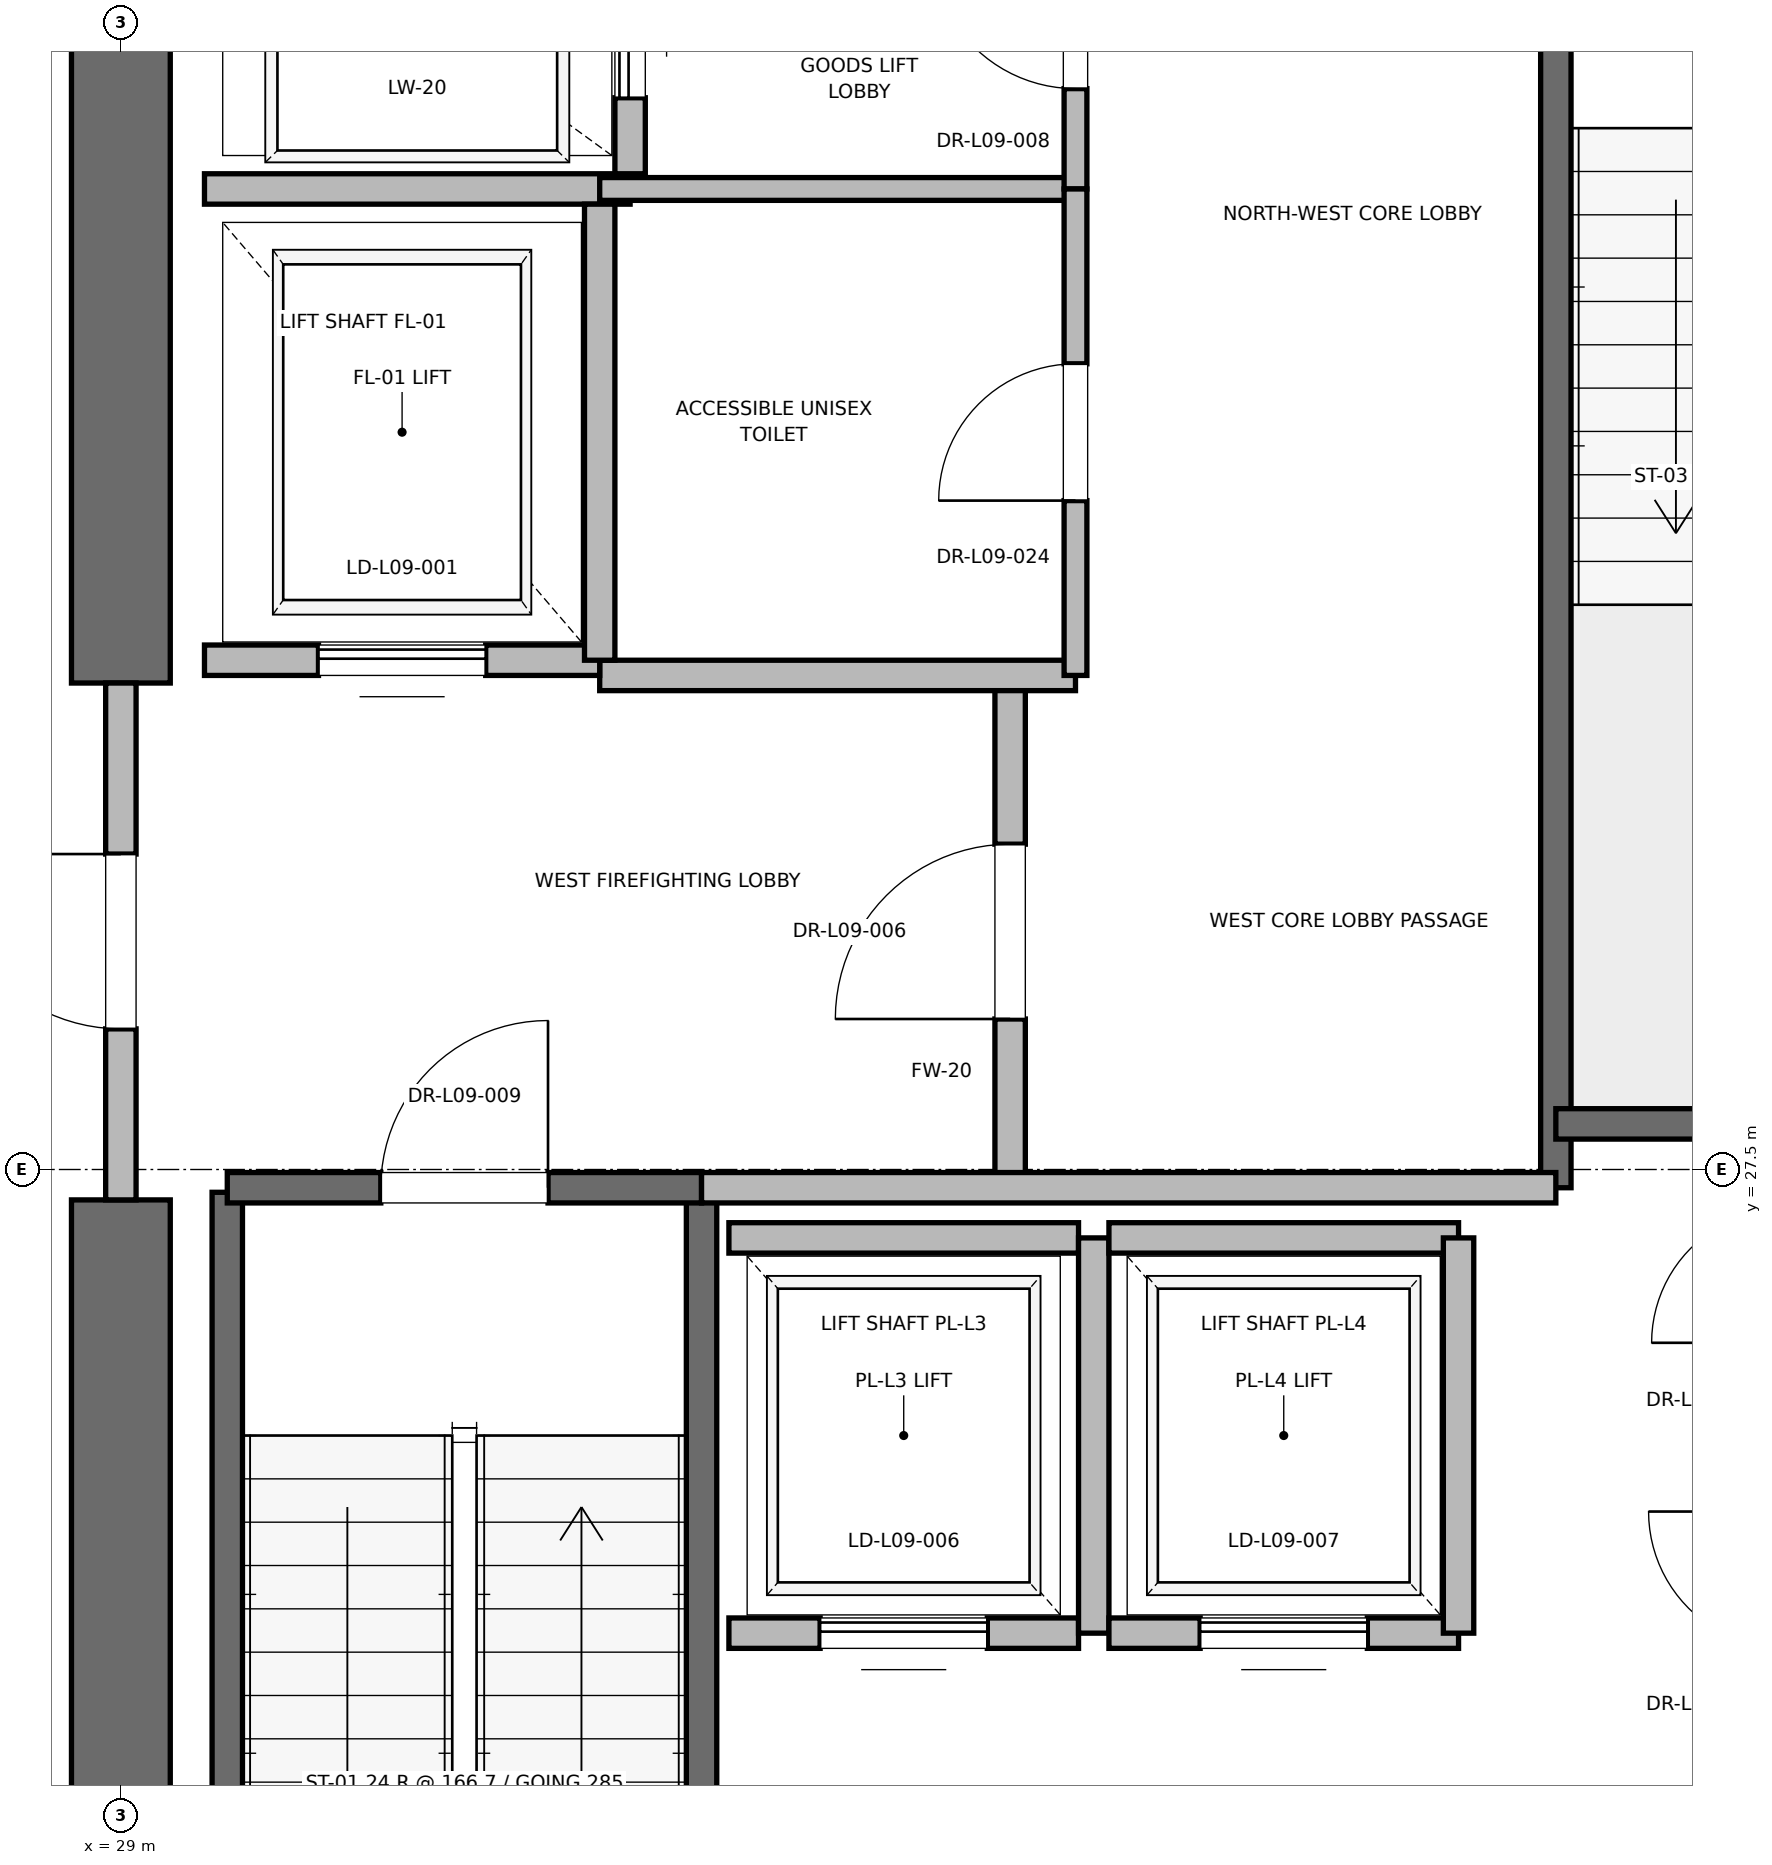
"""IFC4 building model, lengths in metres.
Left out: names, types, materials, properties, quantities, classifications, styles, units other than length and angle.
Written with IfcOpenShell. Run it as: python <this file> out.ifc"""

import sys

from ifc_helpers import new_model, si_unit, direction, frame, frame_2d, origin, place, context, subcontext, project, spatial, rectangle, extrude, element, fill, save


model = new_model("IFC4")
c1 = context("Model", 3, precision=1e-05, world=origin(), true_north=direction((0.0, 1.0)))
c2 = subcontext(c1, "Body", "Model", "MODEL_VIEW")
j1 = project(units=[si_unit("LENGTHUNIT", "METRE"), si_unit("PLANEANGLEUNIT", "RADIAN")], contexts=[c1])
p1 = place(None, origin())
s1 = spatial("IfcSite", under=j1, at=p1, CompositionType="ELEMENT")
p2 = place(p1, origin())
s2 = spatial("IfcBuilding", under=s1, at=p2, CompositionType="ELEMENT")
p3 = place(p2, frame((0.0, 0.0, 43.6)))
s3 = spatial("IfcBuildingStorey", under=s2, at=p3, CompositionType="ELEMENT", Elevation=43.6)
p4 = place(p3, frame((29.0, 18.5, 0.0), z_axis=(0.0, 0.0, 1.0), x_axis=(0.0, 1.0, 0.0)))
e1 = element("IfcWall", 1, at=p4, inside=s3, PredefinedType="SHEAR", context=c2, shape_type="SweptSolid", body=[
    extrude(rectangle(XDim=8.8, YDim=0.65, at=frame_2d((4.4, 0.0))), origin(), (0.0, 0.0, 1.0), 3.76),
])
p5 = place(p3, frame((29.0, 30.7, 0.0), z_axis=(0.0, 0.0, 1.0), x_axis=(0.0, 1.0, 0.0)))
e2 = element("IfcWall", 2, at=p5, inside=s3, PredefinedType="SHEAR", context=c2, shape_type="SweptSolid", body=[
    extrude(rectangle(XDim=5.8, YDim=0.65, at=frame_2d((2.9, 0.0))), origin(), (0.0, 0.0, 1.0), 3.76),
])
p6 = place(p3, frame((29.7, 19.2, 0.0), z_axis=(0.0, 0.0, 1.0), x_axis=(0.0, 1.0, 0.0)))
e3 = element("IfcWall", 3, at=p6, inside=s3, PredefinedType="SOLIDWALL", context=c2, shape_type="SweptSolid", body=[
    extrude(rectangle(XDim=8.15, YDim=0.2, at=frame_2d((4.075, 0.0))), origin(), (0.0, 0.0, 1.0), 3.76),
])
p7 = place(p3, frame((32.82, 18.6, 0.0), z_axis=(0.0, 0.0, 1.0), x_axis=(0.0, 1.0, 0.0)))
e4 = element("IfcWall", 4, at=p7, inside=s3, PredefinedType="SOLIDWALL", context=c2, shape_type="SweptSolid", body=[
    extrude(rectangle(XDim=8.78, YDim=0.2, at=frame_2d((4.39, 0.0))), origin(), (0.0, 0.0, 1.0), 3.76),
])
p8 = place(p3, frame((29.7, 27.38, 0.0), z_axis=(0.0, 0.0, 1.0), x_axis=(1.0, 0.0, 0.0)))
e5 = element("IfcWall", 5, at=p8, inside=s3, PredefinedType="SOLIDWALL", context=c2, shape_type="SweptSolid", body=[
    extrude(rectangle(XDim=3.12, YDim=0.2, at=frame_2d((1.56, 0.0))), origin(), (0.0, 0.0, 1.0), 3.76),
])
p9 = place(p8, frame((1.01, 0.0, 0.0)))
e6 = element("IfcOpeningElement", 6, at=p9, cuts=e5, PredefinedType="OPENING", context=c2, shape_type="SweptSolid", body=[
    extrude(rectangle(XDim=1.1, YDim=2.15, at=frame_2d((0.55, 1.075))), frame((0.0, 0.1, 0.0), z_axis=(0.0, -1.0, 0.0), x_axis=(1.0, 0.0, 0.0)), (0.0, 0.0, 1.0), 0.2),
])
p10 = place(p3, frame((38.44, 27.38, 0.0), z_axis=(0.0, 0.0, 1.0), x_axis=(0.0, 1.0, 0.0)))
e7 = element("IfcWall", 7, at=p10, inside=s3, PredefinedType="SOLIDWALL", context=c2, shape_type="SweptSolid", body=[
    extrude(rectangle(XDim=8.87, YDim=0.2, at=frame_2d((4.435, 0.0))), origin(), (0.0, 0.0, 1.0), 3.76),
])
p11 = place(p3, frame((38.44, 27.8, 0.0), z_axis=(0.0, 0.0, 1.0), x_axis=(1.0, 0.0, 0.0)))
e8 = element("IfcWall", 8, at=p11, inside=s3, PredefinedType="SOLIDWALL", context=c2, shape_type="SweptSolid", body=[
    extrude(rectangle(XDim=3.32, YDim=0.2, at=frame_2d((1.66, 0.0))), origin(), (0.0, 0.0, 1.0), 3.76),
])
p12 = place(p3, frame((34.85, 27.38, 0.0), z_axis=(0.0, 0.0, 1.0), x_axis=(0.0, 1.0, 0.0)))
e9 = element("IfcWall", 9, at=p12, inside=s3, PredefinedType="PARTITIONING", context=c2, shape_type="SweptSolid", body=[
    extrude(rectangle(XDim=3.37, YDim=0.2, at=frame_2d((1.685, 0.0))), origin(), (0.0, 0.0, 1.0), 3.76),
])
p13 = place(p12, frame((1.11, 0.0, 0.0)))
e10 = element("IfcOpeningElement", 10, at=p13, cuts=e9, PredefinedType="OPENING", context=c2, shape_type="SweptSolid", body=[
    extrude(rectangle(XDim=1.15, YDim=2.2, at=frame_2d((0.575, 1.1))), frame((0.0, 0.1, 0.0), z_axis=(0.0, -1.0, 0.0), x_axis=(1.0, 0.0, 0.0)), (0.0, 0.0, 1.0), 0.2),
])
p14 = place(p3, frame((29.0, 27.3, 0.0), z_axis=(0.0, 0.0, 1.0), x_axis=(0.0, 1.0, 0.0)))
e11 = element("IfcWall", 11, at=p14, inside=s3, PredefinedType="PARTITIONING", context=c2, shape_type="SweptSolid", body=[
    extrude(rectangle(XDim=3.4, YDim=0.2, at=frame_2d((1.7, 0.0))), origin(), (0.0, 0.0, 1.0), 2.54),
])
p15 = place(p14, frame((1.125, 0.0, 0.0)))
e12 = element("IfcOpeningElement", 12, at=p15, cuts=e11, PredefinedType="OPENING", context=c2, shape_type="SweptSolid", body=[
    extrude(rectangle(XDim=1.15, YDim=2.2, at=frame_2d((0.575, 1.1))), frame((0.0, 0.1, 0.0), z_axis=(0.0, -1.0, 0.0), x_axis=(1.0, 0.0, 0.0)), (0.0, 0.0, 1.0), 0.2),
])
p16 = place(p3, frame((32.82, 27.38, 0.0), z_axis=(0.0, 0.0, 1.0), x_axis=(1.0, 0.0, 0.0)))
e13 = element("IfcWall", 13, at=p16, inside=s3, PredefinedType="PARTITIONING", context=c2, shape_type="SweptSolid", body=[
    extrude(rectangle(XDim=5.62, YDim=0.2, at=frame_2d((2.81, 0.0))), origin(), (0.0, 0.0, 1.0), 3.76),
])
p17 = place(p3, frame((32.15, 30.75, 0.0), z_axis=(0.0, 0.0, 1.0), x_axis=(1.0, 0.0, 0.0)))
e14 = element("IfcWall", 14, at=p17, inside=s3, PredefinedType="PARTITIONING", context=c2, shape_type="SweptSolid", body=[
    extrude(rectangle(XDim=3.13, YDim=0.2, at=frame_2d((1.565, 0.0))), origin(), (0.0, 0.0, 1.0), 3.76),
])
p18 = place(p3, frame((29.55, 30.85, 0.0), z_axis=(0.0, 0.0, 1.0), x_axis=(1.0, 0.0, 0.0)))
e15 = element("IfcWall", 15, at=p18, inside=s3, PredefinedType="SOLIDWALL", context=c2, shape_type="SweptSolid", body=[
    extrude(rectangle(XDim=2.6, YDim=0.2, at=frame_2d((1.3, 0.0))), origin(), (0.0, 0.0, 1.0), 2.54),
])
p19 = place(p18, frame((0.75, 0.0, 0.0)))
e16 = element("IfcOpeningElement", 16, at=p19, cuts=e15, PredefinedType="OPENING", context=c2, shape_type="SweptSolid", body=[
    extrude(rectangle(XDim=1.1, YDim=2.2, at=frame_2d((0.55, 1.1))), frame((0.0, 0.1, 0.0), z_axis=(0.0, -1.0, 0.0), x_axis=(1.0, 0.0, 0.0)), (0.0, 0.0, 1.0), 0.2),
])
p20 = place(p3, frame((29.55, 33.95, 0.0), z_axis=(0.0, 0.0, 1.0), x_axis=(1.0, 0.0, 0.0)))
e17 = element("IfcWall", 17, at=p20, inside=s3, PredefinedType="SOLIDWALL", context=c2, shape_type="SweptSolid", body=[
    extrude(rectangle(XDim=2.8, YDim=0.2, at=frame_2d((1.4, 0.0))), origin(), (0.0, 0.0, 1.0), 3.76),
])
p21 = place(p3, frame((32.15, 30.85, 0.0), z_axis=(0.0, 0.0, 1.0), x_axis=(0.0, 1.0, 0.0)))
e18 = element("IfcWall", 18, at=p21, inside=s3, PredefinedType="SOLIDWALL", context=c2, shape_type="SweptSolid", body=[
    extrude(rectangle(XDim=3.0, YDim=0.2, at=frame_2d((1.5, 0.0))), origin(), (0.0, 0.0, 1.0), 3.76),
])
p22 = place(p3, frame((32.35, 34.05, 0.0), z_axis=(0.0, 0.0, 1.0), x_axis=(0.0, 1.0, 0.0)))
e19 = element("IfcWall", 19, at=p22, inside=s3, PredefinedType="SOLIDWALL", context=c2, shape_type="SweptSolid", body=[
    extrude(rectangle(XDim=2.1, YDim=0.2, at=frame_2d((1.05, 0.0))), origin(), (0.0, 0.0, 1.0), 3.76),
])
p23 = place(p22, frame((0.5, 0.0, 0.0)))
e20 = element("IfcOpeningElement", 20, at=p23, cuts=e19, PredefinedType="OPENING", context=c2, shape_type="SweptSolid", body=[
    extrude(rectangle(XDim=1.1, YDim=2.2, at=frame_2d((0.55, 1.1))), frame((0.0, 0.1, 0.0), z_axis=(0.0, -1.0, 0.0), x_axis=(1.0, 0.0, 0.0)), (0.0, 0.0, 1.0), 0.2),
])
p24 = place(p3, frame((33.0, 24.45, 0.0), z_axis=(0.0, 0.0, 1.0), x_axis=(1.0, 0.0, 0.0)))
e21 = element("IfcWall", 21, at=p24, inside=s3, PredefinedType="SOLIDWALL", context=c2, shape_type="SweptSolid", body=[
    extrude(rectangle(XDim=2.3, YDim=0.2, at=frame_2d((1.15, 0.0))), origin(), (0.0, 0.0, 1.0), 3.76),
])
p25 = place(p24, frame((0.6, 0.0, 0.0)))
e22 = element("IfcOpeningElement", 22, at=p25, cuts=e21, PredefinedType="OPENING", context=c2, shape_type="SweptSolid", body=[
    extrude(rectangle(XDim=1.1, YDim=2.2, at=frame_2d((0.55, 1.1))), frame((0.0, 0.1, 0.0), z_axis=(0.0, -1.0, 0.0), x_axis=(1.0, 0.0, 0.0)), (0.0, 0.0, 1.0), 0.2),
])
p26 = place(p3, frame((35.3, 27.05, 0.0), z_axis=(0.0, 0.0, 1.0), x_axis=(-1.0, 0.0, 0.0)))
e23 = element("IfcWall", 23, at=p26, inside=s3, PredefinedType="SOLIDWALL", context=c2, shape_type="SweptSolid", body=[
    extrude(rectangle(XDim=2.3, YDim=0.2, at=frame_2d((1.15, 0.0))), origin(), (0.0, 0.0, 1.0), 3.76),
])
p27 = place(p3, frame((35.4, 24.45, 0.0), z_axis=(0.0, 0.0, 1.0), x_axis=(0.0, 1.0, 0.0)))
e24 = element("IfcWall", 24, at=p27, inside=s3, PredefinedType="SOLIDWALL", context=c2, shape_type="SweptSolid", body=[
    extrude(rectangle(XDim=2.6, YDim=0.2, at=frame_2d((1.3, 0.0))), origin(), (0.0, 0.0, 1.0), 3.76),
])
p28 = place(p3, frame((35.5, 24.45, 0.0), z_axis=(0.0, 0.0, 1.0), x_axis=(1.0, 0.0, 0.0)))
e25 = element("IfcWall", 25, at=p28, inside=s3, PredefinedType="SOLIDWALL", context=c2, shape_type="SweptSolid", body=[
    extrude(rectangle(XDim=2.3, YDim=0.2, at=frame_2d((1.15, 0.0))), origin(), (0.0, 0.0, 1.0), 3.76),
])
p29 = place(p28, frame((0.6, 0.0, 0.0)))
e26 = element("IfcOpeningElement", 26, at=p29, cuts=e25, PredefinedType="OPENING", context=c2, shape_type="SweptSolid", body=[
    extrude(rectangle(XDim=1.1, YDim=2.2, at=frame_2d((0.55, 1.1))), frame((0.0, 0.1, 0.0), z_axis=(0.0, -1.0, 0.0), x_axis=(1.0, 0.0, 0.0)), (0.0, 0.0, 1.0), 0.2),
])
p30 = place(p3, frame((37.8, 27.05, 0.0), z_axis=(0.0, 0.0, 1.0), x_axis=(-1.0, 0.0, 0.0)))
e27 = element("IfcWall", 27, at=p30, inside=s3, PredefinedType="SOLIDWALL", context=c2, shape_type="SweptSolid", body=[
    extrude(rectangle(XDim=2.3, YDim=0.2, at=frame_2d((1.15, 0.0))), origin(), (0.0, 0.0, 1.0), 3.76),
])
p31 = place(p3, frame((37.8, 24.45, 0.0), z_axis=(0.0, 0.0, 1.0), x_axis=(0.0, 1.0, 0.0)))
e28 = element("IfcWall", 28, at=p31, inside=s3, PredefinedType="SOLIDWALL", context=c2, shape_type="SweptSolid", body=[
    extrude(rectangle(XDim=2.6, YDim=0.2, at=frame_2d((1.3, 0.0))), origin(), (0.0, 0.0, 1.0), 3.76),
])
p32 = place(p3, frame((32.15, 33.95, 0.0), z_axis=(0.0, 0.0, 1.0), x_axis=(1.0, 0.0, 0.0)))
e29 = element("IfcWall", 29, at=p32, inside=s3, PredefinedType="PARTITIONING", context=c2, shape_type="SweptSolid", body=[
    extrude(rectangle(XDim=3.13, YDim=0.15, at=frame_2d((1.565, 0.0))), origin(), (0.0, 0.0, 1.0), 2.85),
])
p33 = place(p3, frame((35.28, 33.95, 0.0), z_axis=(0.0, 0.0, 1.0), x_axis=(0.0, 1.0, 0.0)))
e30 = element("IfcWall", 30, at=p33, inside=s3, PredefinedType="PARTITIONING", context=c2, shape_type="SweptSolid", body=[
    extrude(rectangle(XDim=2.27, YDim=0.15, at=frame_2d((1.135, 0.0))), origin(), (0.0, 0.0, 1.0), 2.54),
])
p34 = place(p33, frame((0.66, 0.0, 0.0)))
e31 = element("IfcOpeningElement", 31, at=p34, cuts=e30, PredefinedType="OPENING", context=c2, shape_type="SweptSolid", body=[
    extrude(rectangle(XDim=0.95, YDim=2.15, at=frame_2d((0.475, 1.075))), frame((0.0, 0.075, 0.0), z_axis=(0.0, -1.0, 0.0), x_axis=(1.0, 0.0, 0.0)), (0.0, 0.0, 1.0), 0.15),
])
p35 = place(p3, frame((35.28, 30.75, 0.0), z_axis=(0.0, 0.0, 1.0), x_axis=(0.0, 1.0, 0.0)))
e32 = element("IfcWall", 32, at=p35, inside=s3, PredefinedType="PARTITIONING", context=c2, shape_type="SweptSolid", body=[
    extrude(rectangle(XDim=3.2, YDim=0.15, at=frame_2d((1.6, 0.0))), origin(), (0.0, 0.0, 1.0), 2.85),
])
p36 = place(p35, frame((1.15, 0.0, 0.0)))
e33 = element("IfcOpeningElement", 33, at=p36, cuts=e32, PredefinedType="OPENING", context=c2, shape_type="SweptSolid", body=[
    extrude(rectangle(XDim=0.9, YDim=2.1, at=frame_2d((0.45, 1.05))), frame((0.0, 0.075, 0.0), z_axis=(0.0, -1.0, 0.0), x_axis=(1.0, 0.0, 0.0)), (0.0, 0.0, 1.0), 0.15),
])
p37 = place(p9, origin())
e34 = element("IfcDoor", 34, at=p37, inside=s3, OperationType="SINGLE_SWING_RIGHT", PredefinedType="DOOR", context=c2, shape_type="SweptSolid", body=[
    extrude(rectangle(XDim=1.1, YDim=2.15, at=frame_2d((0.55, 1.075))), frame((0.0, 0.025, 0.0), z_axis=(0.0, -1.0, 0.0), x_axis=(1.0, 0.0, 0.0)), (0.0, 0.0, 1.0), 0.05),
])
fill(e6, e34)
p38 = place(p13, origin())
e35 = element("IfcDoor", 35, at=p38, inside=s3, OperationType="SINGLE_SWING_LEFT", PredefinedType="DOOR", context=c2, shape_type="SweptSolid", body=[
    extrude(rectangle(XDim=1.15, YDim=2.2, at=frame_2d((0.575, 1.1))), frame((0.0, 0.025, 0.0), z_axis=(0.0, -1.0, 0.0), x_axis=(1.0, 0.0, 0.0)), (0.0, 0.0, 1.0), 0.05),
])
fill(e10, e35)
p39 = place(p15, origin())
e36 = element("IfcDoor", 36, at=p39, inside=s3, OperationType="SINGLE_SWING_RIGHT", PredefinedType="DOOR", context=c2, shape_type="SweptSolid", body=[
    extrude(rectangle(XDim=1.15, YDim=2.2, at=frame_2d((0.575, 1.1))), frame((0.0, 0.025, 0.0), z_axis=(0.0, -1.0, 0.0), x_axis=(1.0, 0.0, 0.0)), (0.0, 0.0, 1.0), 0.05),
])
fill(e12, e36)
p40 = place(p19, origin())
e37 = element("IfcDoor", 37, at=p40, inside=s3, OperationType="SLIDING_TO_RIGHT", PredefinedType="DOOR", context=c2, shape_type="SweptSolid", body=[
    extrude(rectangle(XDim=1.1, YDim=2.2, at=frame_2d((0.55, 1.1))), frame((0.0, 0.025, 0.0), z_axis=(0.0, -1.0, 0.0), x_axis=(1.0, 0.0, 0.0)), (0.0, 0.0, 1.0), 0.05),
])
fill(e16, e37)
p41 = place(p23, origin())
e38 = element("IfcDoor", 38, at=p41, inside=s3, OperationType="SLIDING_TO_RIGHT", PredefinedType="DOOR", context=c2, shape_type="SweptSolid", body=[
    extrude(rectangle(XDim=1.1, YDim=2.2, at=frame_2d((0.55, 1.1))), frame((0.0, 0.025, 0.0), z_axis=(0.0, -1.0, 0.0), x_axis=(1.0, 0.0, 0.0)), (0.0, 0.0, 1.0), 0.05),
])
fill(e20, e38)
p42 = place(p25, origin())
e39 = element("IfcDoor", 39, at=p42, inside=s3, OperationType="SLIDING_TO_RIGHT", PredefinedType="DOOR", context=c2, shape_type="SweptSolid", body=[
    extrude(rectangle(XDim=1.1, YDim=2.2, at=frame_2d((0.55, 1.1))), frame((0.0, 0.025, 0.0), z_axis=(0.0, -1.0, 0.0), x_axis=(1.0, 0.0, 0.0)), (0.0, 0.0, 1.0), 0.05),
])
fill(e22, e39)
p43 = place(p29, origin())
e40 = element("IfcDoor", 40, at=p43, inside=s3, OperationType="SLIDING_TO_RIGHT", PredefinedType="DOOR", context=c2, shape_type="SweptSolid", body=[
    extrude(rectangle(XDim=1.1, YDim=2.2, at=frame_2d((0.55, 1.1))), frame((0.0, 0.025, 0.0), z_axis=(0.0, -1.0, 0.0), x_axis=(1.0, 0.0, 0.0)), (0.0, 0.0, 1.0), 0.05),
])
fill(e26, e40)
p44 = place(p34, origin())
e41 = element("IfcDoor", 41, at=p44, inside=s3, OperationType="SINGLE_SWING_RIGHT", PredefinedType="DOOR", context=c2, shape_type="SweptSolid", body=[
    extrude(rectangle(XDim=0.95, YDim=2.15, at=frame_2d((0.475, 1.075))), frame((0.0, 0.025, 0.0), z_axis=(0.0, -1.0, 0.0), x_axis=(1.0, 0.0, 0.0)), (0.0, 0.0, 1.0), 0.05),
])
fill(e31, e41)
p45 = place(p36, origin())
e42 = element("IfcDoor", 42, at=p45, inside=s3, OperationType="SINGLE_SWING_LEFT", PredefinedType="DOOR", context=c2, shape_type="SweptSolid", body=[
    extrude(rectangle(XDim=0.9, YDim=2.1, at=frame_2d((0.45, 1.05))), frame((0.0, 0.025, 0.0), z_axis=(0.0, -1.0, 0.0), x_axis=(1.0, 0.0, 0.0)), (0.0, 0.0, 1.0), 0.05),
])
fill(e33, e42)
save(model, sys.argv[1])
